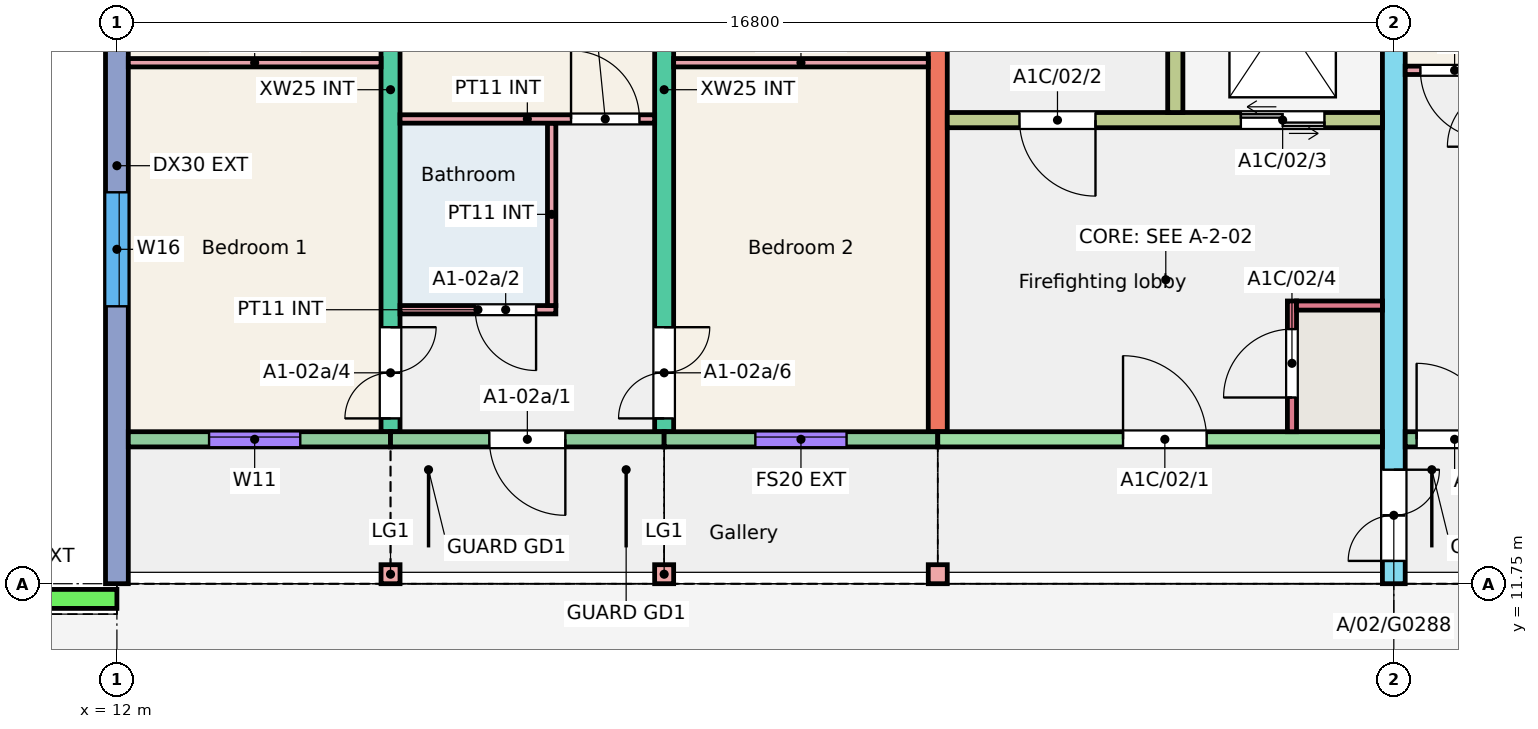
"""IFC4 building model, lengths in metres.
Left out: names, types, materials, properties, quantities, classifications, styles, units other than length and angle.
Written with IfcOpenShell. Run it as: python <this file> out.ifc"""

import sys

from ifc_helpers import new_model, si_unit, direction, frame, frame_2d, origin, origin_2d, place, context, subcontext, project, spatial, rectangle, extrude, element, fill, save


model = new_model("IFC4")
c1 = context("Model", 3, precision=1e-05, world=origin(), true_north=direction((0.0, 1.0)))
c2 = subcontext(c1, "Body", "Model", "MODEL_VIEW")
j1 = project(units=[si_unit("LENGTHUNIT", "METRE"), si_unit("PLANEANGLEUNIT", "RADIAN")], contexts=[c1])
p1 = place(None, origin())
s1 = spatial("IfcSite", under=j1, at=p1, CompositionType="ELEMENT")
p2 = place(p1, origin())
s2 = spatial("IfcBuilding", under=s1, at=p2, CompositionType="ELEMENT")
p3 = place(p2, frame((0.0, 0.0, 6.0)))
s3 = spatial("IfcBuildingStorey", under=s2, at=p3, CompositionType="ELEMENT", Elevation=6.0)
p4 = place(p3, frame((12.0, 11.75, 0.0), z_axis=(0.0, 0.0, 1.0), x_axis=(0.0, 1.0, 0.0)))
e1 = element("IfcWall", 1, at=p4, inside=s3, PredefinedType="SHEAR", context=c2, shape_type="SweptSolid", body=[
    extrude(rectangle(XDim=11.0, YDim=0.3, at=frame_2d((5.5, 0.0))), origin(), (0.0, 0.0, 1.0), 3.0),
])
p5 = place(p4, frame((3.65, 0.0, 0.9)))
e2 = element("IfcOpeningElement", 2, at=p5, cuts=e1, PredefinedType="OPENING", context=c2, shape_type="SweptSolid", body=[
    extrude(rectangle(XDim=1.5, YDim=1.5, at=frame_2d((0.75, 0.75))), frame((0.0, 0.16, 0.0), z_axis=(0.0, -1.0, 0.0), x_axis=(1.0, 0.0, 0.0)), (0.0, 0.0, 1.0), 0.32),
])
p6 = place(p4, frame((8.355, 0.0, 0.9)))
e3 = element("IfcOpeningElement", 3, at=p6, cuts=e1, PredefinedType="OPENING", context=c2, shape_type="SweptSolid", body=[
    extrude(rectangle(XDim=1.2, YDim=1.5, at=frame_2d((0.6, 0.75))), frame((0.0, 0.16, 0.0), z_axis=(0.0, -1.0, 0.0), x_axis=(1.0, 0.0, 0.0)), (0.0, 0.0, 1.0), 0.32),
])
p7 = place(p3, frame((15.6, 13.75, 0.0), z_axis=(0.0, 0.0, 1.0), x_axis=(0.0, 1.0, 0.0)))
e4 = element("IfcWall", 4, at=p7, inside=s3, PredefinedType="SHEAR", context=c2, shape_type="SweptSolid", body=[
    extrude(rectangle(XDim=9.0, YDim=0.25, at=frame_2d((4.5, 0.0))), origin(), (0.0, 0.0, 1.0), 3.0),
])
p8 = place(p7, frame((0.175, 0.0, 0.0)))
e5 = element("IfcOpeningElement", 5, at=p8, cuts=e4, PredefinedType="OPENING", context=c2, shape_type="SweptSolid", body=[
    extrude(rectangle(XDim=1.2, YDim=2.1, at=frame_2d((0.6, 1.05))), frame((0.0, 0.135, 0.0), z_axis=(0.0, -1.0, 0.0), x_axis=(1.0, 0.0, 0.0)), (0.0, 0.0, 1.0), 0.27),
])
p9 = place(p7, frame((6.4, 0.0, 0.0)))
e6 = element("IfcOpeningElement", 6, at=p9, cuts=e4, PredefinedType="OPENING", context=c2, shape_type="SweptSolid", body=[
    extrude(rectangle(XDim=1.2, YDim=2.1, at=frame_2d((0.6, 1.05))), frame((0.0, 0.135, 0.0), z_axis=(0.0, -1.0, 0.0), x_axis=(1.0, 0.0, 0.0)), (0.0, 0.0, 1.0), 0.27),
])
p10 = place(p3, frame((19.2, 13.75, 0.0), z_axis=(0.0, 0.0, 1.0), x_axis=(0.0, 1.0, 0.0)))
e7 = element("IfcWall", 7, at=p10, inside=s3, PredefinedType="SHEAR", context=c2, shape_type="SweptSolid", body=[
    extrude(rectangle(XDim=9.0, YDim=0.25, at=frame_2d((4.5, 0.0))), origin(), (0.0, 0.0, 1.0), 3.0),
])
p11 = place(p10, frame((0.175, 0.0, 0.0)))
e8 = element("IfcOpeningElement", 8, at=p11, cuts=e7, PredefinedType="OPENING", context=c2, shape_type="SweptSolid", body=[
    extrude(rectangle(XDim=1.2, YDim=2.1, at=frame_2d((0.6, 1.05))), frame((0.0, 0.135, 0.0), z_axis=(0.0, -1.0, 0.0), x_axis=(1.0, 0.0, 0.0)), (0.0, 0.0, 1.0), 0.27),
])
p12 = place(p10, frame((6.4, 0.0, 0.0)))
e9 = element("IfcOpeningElement", 9, at=p12, cuts=e7, PredefinedType="OPENING", context=c2, shape_type="SweptSolid", body=[
    extrude(rectangle(XDim=1.2, YDim=2.1, at=frame_2d((0.6, 1.05))), frame((0.0, 0.135, 0.0), z_axis=(0.0, -1.0, 0.0), x_axis=(1.0, 0.0, 0.0)), (0.0, 0.0, 1.0), 0.27),
])
p13 = place(p3, frame((22.8, 13.75, 0.0), z_axis=(0.0, 0.0, 1.0), x_axis=(0.0, 1.0, 0.0)))
e10 = element("IfcWall", 10, at=p13, inside=s3, PredefinedType="SHEAR", context=c2, shape_type="SweptSolid", body=[
    extrude(rectangle(XDim=9.0, YDim=0.25, at=frame_2d((4.5, 0.0))), origin(), (0.0, 0.0, 1.0), 3.0),
])
p14 = place(p3, frame((28.8, 11.75, 0.0), z_axis=(0.0, 0.0, 1.0), x_axis=(0.0, 1.0, 0.0)))
e11 = element("IfcWall", 11, at=p14, inside=s3, PredefinedType="SHEAR", context=c2, shape_type="SweptSolid", body=[
    extrude(rectangle(XDim=11.0, YDim=0.3, at=frame_2d((5.5, 0.0))), origin(), (0.0, 0.0, 1.0), 3.0),
])
p15 = place(p14, frame((0.3, 0.0, 0.0)))
e12 = element("IfcOpeningElement", 12, at=p15, cuts=e11, PredefinedType="OPENING", context=c2, shape_type="SweptSolid", body=[
    extrude(rectangle(XDim=1.2, YDim=2.1, at=frame_2d((0.6, 1.05))), frame((0.0, 0.16, 0.0), z_axis=(0.0, -1.0, 0.0), x_axis=(1.0, 0.0, 0.0)), (0.0, 0.0, 1.0), 0.32),
])
p16 = place(p3, frame((12.15, 13.65, 0.0), z_axis=(0.0, 0.0, 1.0), x_axis=(1.0, 0.0, 0.0)))
e13 = element("IfcWall", 13, at=p16, inside=s3, PredefinedType="SOLIDWALL", context=c2, shape_type="SweptSolid", body=[
    extrude(rectangle(XDim=3.45, YDim=0.2, at=frame_2d((1.725, 0.0))), origin(), (0.0, 0.0, 1.0), 3.0),
])
p17 = place(p16, frame((1.062, 0.0, 0.8)))
e14 = element("IfcOpeningElement", 14, at=p17, cuts=e13, PredefinedType="OPENING", context=c2, shape_type="SweptSolid", body=[
    extrude(rectangle(XDim=1.2, YDim=1.6, at=frame_2d((0.6, 0.8))), frame((0.0, 0.11, 0.0), z_axis=(0.0, -1.0, 0.0), x_axis=(1.0, 0.0, 0.0)), (0.0, 0.0, 1.0), 0.22),
])
p18 = place(p3, frame((15.6, 13.65, 0.0), z_axis=(0.0, 0.0, 1.0), x_axis=(1.0, 0.0, 0.0)))
e15 = element("IfcWall", 15, at=p18, inside=s3, PredefinedType="SOLIDWALL", context=c2, shape_type="SweptSolid", body=[
    extrude(rectangle(XDim=3.6, YDim=0.2, at=frame_2d((1.8, 0.0))), origin(), (0.0, 0.0, 1.0), 3.0),
])
p19 = place(p18, frame((1.3, 0.0, 0.0)))
e16 = element("IfcOpeningElement", 16, at=p19, cuts=e15, PredefinedType="OPENING", context=c2, shape_type="SweptSolid", body=[
    extrude(rectangle(XDim=1.0, YDim=2.1, at=frame_2d((0.5, 1.05))), frame((0.0, 0.11, 0.0), z_axis=(0.0, -1.0, 0.0), x_axis=(1.0, 0.0, 0.0)), (0.0, 0.0, 1.0), 0.22),
])
p20 = place(p3, frame((19.2, 13.65, 0.0), z_axis=(0.0, 0.0, 1.0), x_axis=(1.0, 0.0, 0.0)))
e17 = element("IfcWall", 17, at=p20, inside=s3, PredefinedType="SOLIDWALL", context=c2, shape_type="SweptSolid", body=[
    extrude(rectangle(XDim=3.6, YDim=0.2, at=frame_2d((1.8, 0.0))), origin(), (0.0, 0.0, 1.0), 3.0),
])
p21 = place(p20, frame((1.2, 0.0, 0.8)))
e18 = element("IfcOpeningElement", 18, at=p21, cuts=e17, PredefinedType="OPENING", context=c2, shape_type="SweptSolid", body=[
    extrude(rectangle(XDim=1.2, YDim=1.6, at=frame_2d((0.6, 0.8))), frame((0.0, 0.11, 0.0), z_axis=(0.0, -1.0, 0.0), x_axis=(1.0, 0.0, 0.0)), (0.0, 0.0, 1.0), 0.22),
])
p22 = place(p3, frame((22.8, 13.65, 0.0), z_axis=(0.0, 0.0, 1.0), x_axis=(1.0, 0.0, 0.0)))
e19 = element("IfcWall", 19, at=p22, inside=s3, PredefinedType="SHEAR", context=c2, shape_type="SweptSolid", body=[
    extrude(rectangle(XDim=5.85, YDim=0.2, at=frame_2d((2.925, 0.0))), origin(), (0.0, 0.0, 1.0), 3.0),
])
p23 = place(p22, frame((2.438, 0.0, 0.0)))
e20 = element("IfcOpeningElement", 20, at=p23, cuts=e19, PredefinedType="OPENING", context=c2, shape_type="SweptSolid", body=[
    extrude(rectangle(XDim=1.1, YDim=2.1, at=frame_2d((0.55, 1.05))), frame((0.0, 0.11, 0.0), z_axis=(0.0, -1.0, 0.0), x_axis=(1.0, 0.0, 0.0)), (0.0, 0.0, 1.0), 0.22),
])
p24 = place(p3, frame((22.925, 17.85, 0.0), z_axis=(0.0, 0.0, 1.0), x_axis=(1.0, 0.0, 0.0)))
e21 = element("IfcWall", 21, at=p24, inside=s3, PredefinedType="SHEAR", context=c2, shape_type="SweptSolid", body=[
    extrude(rectangle(XDim=5.725, YDim=0.2, at=frame_2d((2.862, 0.0))), origin(), (0.0, 0.0, 1.0), 3.0),
])
p25 = place(p24, frame((0.95, 0.0, 0.0)))
e22 = element("IfcOpeningElement", 22, at=p25, cuts=e21, PredefinedType="OPENING", context=c2, shape_type="SweptSolid", body=[
    extrude(rectangle(XDim=1.0, YDim=2.1, at=frame_2d((0.5, 1.05))), frame((0.0, 0.11, 0.0), z_axis=(0.0, -1.0, 0.0), x_axis=(1.0, 0.0, 0.0)), (0.0, 0.0, 1.0), 0.22),
])
p26 = place(p24, frame((3.863, 0.0, 0.0)))
e23 = element("IfcOpeningElement", 23, at=p26, cuts=e21, PredefinedType="OPENING", context=c2, shape_type="SweptSolid", body=[
    extrude(rectangle(XDim=1.1, YDim=2.1, at=frame_2d((0.55, 1.05))), frame((0.0, 0.11, 0.0), z_axis=(0.0, -1.0, 0.0), x_axis=(1.0, 0.0, 0.0)), (0.0, 0.0, 1.0), 0.22),
])
p27 = place(p3, frame((25.925, 17.95, 0.0), z_axis=(0.0, 0.0, 1.0), x_axis=(0.0, 1.0, 0.0)))
e24 = element("IfcWall", 24, at=p27, inside=s3, PredefinedType="SHEAR", context=c2, shape_type="SweptSolid", body=[
    extrude(rectangle(XDim=4.8, YDim=0.2, at=frame_2d((2.4, 0.0))), origin(), (0.0, 0.0, 1.0), 3.0),
])
p28 = place(p3, frame((27.46, 13.75, 0.0), z_axis=(0.0, 0.0, 1.0), x_axis=(0.0, 1.0, 0.0)))
e25 = element("IfcWall", 25, at=p28, inside=s3, PredefinedType="SHEAR", context=c2, shape_type="SweptSolid", body=[
    extrude(rectangle(XDim=1.72, YDim=0.12, at=frame_2d((0.86, 0.0))), origin(), (0.0, 0.0, 1.0), 3.0),
])
p29 = place(p28, frame((0.45, 0.0, 0.0)))
e26 = element("IfcOpeningElement", 26, at=p29, cuts=e25, PredefinedType="OPENING", context=c2, shape_type="SweptSolid", body=[
    extrude(rectangle(XDim=0.9, YDim=2.1, at=frame_2d((0.45, 1.05))), frame((0.0, 0.07, 0.0), z_axis=(0.0, -1.0, 0.0), x_axis=(1.0, 0.0, 0.0)), (0.0, 0.0, 1.0), 0.14),
])
p30 = place(p3, frame((27.52, 15.41, 0.0), z_axis=(0.0, 0.0, 1.0), x_axis=(1.0, 0.0, 0.0)))
e27 = element("IfcWall", 27, at=p30, inside=s3, PredefinedType="SHEAR", context=c2, shape_type="SweptSolid", body=[
    extrude(rectangle(XDim=1.13, YDim=0.12, at=frame_2d((0.565, 0.0))), origin(), (0.0, 0.0, 1.0), 3.0),
])
p31 = place(p3, frame((28.95, 13.65, 0.0), z_axis=(0.0, 0.0, 1.0), x_axis=(1.0, 0.0, 0.0)))
e28 = element("IfcWall", 28, at=p31, inside=s3, PredefinedType="SOLIDWALL", context=c2, shape_type="SweptSolid", body=[
    extrude(rectangle(XDim=3.45, YDim=0.2, at=frame_2d((1.725, 0.0))), origin(), (0.0, 0.0, 1.0), 3.0),
])
p32 = place(p31, frame((1.768, 0.0, 1.1)))
e29 = element("IfcOpeningElement", 29, at=p32, cuts=e28, PredefinedType="OPENING", context=c2, shape_type="SweptSolid", body=[
    extrude(rectangle(XDim=1.2, YDim=1.3, at=frame_2d((0.6, 0.65))), frame((0.0, 0.11, 0.0), z_axis=(0.0, -1.0, 0.0), x_axis=(1.0, 0.0, 0.0)), (0.0, 0.0, 1.0), 0.22),
])
p33 = place(p31, frame((0.15, 0.0, 0.0)))
e30 = element("IfcOpeningElement", 30, at=p33, cuts=e28, PredefinedType="OPENING", context=c2, shape_type="SweptSolid", body=[
    extrude(rectangle(XDim=1.0, YDim=2.1, at=frame_2d((0.5, 1.05))), frame((0.0, 0.11, 0.0), z_axis=(0.0, -1.0, 0.0), x_axis=(1.0, 0.0, 0.0)), (0.0, 0.0, 1.0), 0.22),
])
for number, where, z_axis, x_axis in (
    (31, (15.6, 11.875, 0.0), (0.0, 0.0, 1.0), (1.0, 0.0, 0.0)),
    (32, (19.2, 11.875, 0.0), (0.0, 0.0, 1.0), (1.0, 0.0, 0.0)),
    (33, (22.8, 11.875, 0.0), (0.0, 0.0, 1.0), (1.0, 0.0, 0.0)),
):
    element("IfcColumn", number, at=place(p3, frame(where, z_axis=z_axis, x_axis=x_axis)), inside=s3, PredefinedType="COLUMN", context=c2, shape_type="SweptSolid", body=[
        extrude(rectangle(XDim=0.25, YDim=0.25, at=origin_2d()), origin(), (0.0, 0.0, 1.0), 3.0),
    ])
p34 = place(p3, frame((9.7, 11.55, 0.0), z_axis=(0.0, 0.0, 1.0), x_axis=(1.0, 0.0, 0.0)))
e34 = element("IfcWall", 34, at=p34, inside=s3, PredefinedType="PARAPET", context=c2, shape_type="SweptSolid", body=[
    extrude(rectangle(XDim=2.3, YDim=0.25, at=frame_2d((1.15, 0.0))), origin(), (0.0, 0.0, 1.0), 1.1),
])
p35 = place(p3, frame((15.725, 15.355, 0.0), z_axis=(0.0, 0.0, 1.0), x_axis=(1.0, 0.0, 0.0)))
e35 = element("IfcWall", 35, at=p35, inside=s3, PredefinedType="PARTITIONING", context=c2, shape_type="SweptSolid", body=[
    extrude(rectangle(XDim=2.05, YDim=0.11, at=frame_2d((1.025, 0.0))), origin(), (0.0, 0.0, 1.0), 2.8),
])
p36 = place(p35, frame((0.99, 0.0, 0.0)))
e36 = element("IfcOpeningElement", 36, at=p36, cuts=e35, PredefinedType="OPENING", context=c2, shape_type="SweptSolid", body=[
    extrude(rectangle(XDim=0.8, YDim=2.1, at=frame_2d((0.4, 1.05))), frame((0.0, 0.065, 0.0), z_axis=(0.0, -1.0, 0.0), x_axis=(1.0, 0.0, 0.0)), (0.0, 0.0, 1.0), 0.13),
])
p37 = place(p3, frame((17.72, 15.41, 0.0), z_axis=(0.0, 0.0, 1.0), x_axis=(0.0, 1.0, 0.0)))
e37 = element("IfcWall", 37, at=p37, inside=s3, PredefinedType="PARTITIONING", context=c2, shape_type="SweptSolid", body=[
    extrude(rectangle(XDim=2.4, YDim=0.11, at=frame_2d((1.2, 0.0))), origin(), (0.0, 0.0, 1.0), 2.8),
])
p38 = place(p3, frame((15.725, 17.865, 0.0), z_axis=(0.0, 0.0, 1.0), x_axis=(1.0, 0.0, 0.0)))
e38 = element("IfcWall", 38, at=p38, inside=s3, PredefinedType="PARTITIONING", context=c2, shape_type="SweptSolid", body=[
    extrude(rectangle(XDim=3.35, YDim=0.11, at=frame_2d((1.675, 0.0))), origin(), (0.0, 0.0, 1.0), 2.8),
])
p39 = place(p38, frame((2.25, 0.0, 0.0)))
e39 = element("IfcOpeningElement", 39, at=p39, cuts=e38, PredefinedType="OPENING", context=c2, shape_type="SweptSolid", body=[
    extrude(rectangle(XDim=0.9, YDim=2.1, at=frame_2d((0.45, 1.05))), frame((0.0, 0.065, 0.0), z_axis=(0.0, -1.0, 0.0), x_axis=(1.0, 0.0, 0.0)), (0.0, 0.0, 1.0), 0.13),
])
p40 = place(p3, frame((12.15, 18.605, 0.0), z_axis=(0.0, 0.0, 1.0), x_axis=(1.0, 0.0, 0.0)))
e40 = element("IfcWall", 40, at=p40, inside=s3, PredefinedType="PARTITIONING", context=c2, shape_type="SweptSolid", body=[
    extrude(rectangle(XDim=3.325, YDim=0.11, at=frame_2d((1.663, 0.0))), origin(), (0.0, 0.0, 1.0), 2.8),
])
p41 = place(p3, frame((19.325, 18.605, 0.0), z_axis=(0.0, 0.0, 1.0), x_axis=(1.0, 0.0, 0.0)))
e41 = element("IfcWall", 41, at=p41, inside=s3, PredefinedType="PARTITIONING", context=c2, shape_type="SweptSolid", body=[
    extrude(rectangle(XDim=3.35, YDim=0.11, at=frame_2d((1.675, 0.0))), origin(), (0.0, 0.0, 1.0), 2.8),
])
p42 = place(p3, frame((28.95, 18.505, 0.0), z_axis=(0.0, 0.0, 1.0), x_axis=(1.0, 0.0, 0.0)))
e42 = element("IfcWall", 42, at=p42, inside=s3, PredefinedType="PARTITIONING", context=c2, shape_type="SweptSolid", body=[
    extrude(rectangle(XDim=3.325, YDim=0.11, at=frame_2d((1.663, 0.0))), origin(), (0.0, 0.0, 1.0), 2.8),
])
p43 = place(p42, frame((0.2, 0.0, 0.0)))
e43 = element("IfcOpeningElement", 43, at=p43, cuts=e42, PredefinedType="OPENING", context=c2, shape_type="SweptSolid", body=[
    extrude(rectangle(XDim=0.9, YDim=2.1, at=frame_2d((0.45, 1.05))), frame((0.0, 0.065, 0.0), z_axis=(0.0, -1.0, 0.0), x_axis=(1.0, 0.0, 0.0)), (0.0, 0.0, 1.0), 0.13),
])
p44 = place(p17, origin())
e44 = element("IfcWindow", 44, at=p44, inside=s3, PartitioningType="SINGLE_PANEL", PredefinedType="WINDOW", context=c2, shape_type="SweptSolid", body=[
    extrude(rectangle(XDim=1.2, YDim=1.6, at=frame_2d((0.6, 0.8))), frame((0.0, 0.06, 0.0), z_axis=(0.0, -1.0, 0.0), x_axis=(1.0, 0.0, 0.0)), (0.0, 0.0, 1.0), 0.06),
])
fill(e14, e44)
p45 = place(p21, origin())
e45 = element("IfcWindow", 45, at=p45, inside=s3, PartitioningType="SINGLE_PANEL", PredefinedType="WINDOW", context=c2, shape_type="SweptSolid", body=[
    extrude(rectangle(XDim=1.2, YDim=1.6, at=frame_2d((0.6, 0.8))), frame((0.0, 0.06, 0.0), z_axis=(0.0, -1.0, 0.0), x_axis=(1.0, 0.0, 0.0)), (0.0, 0.0, 1.0), 0.06),
])
fill(e18, e45)
p46 = place(p5, origin())
e46 = element("IfcWindow", 46, at=p46, inside=s3, PartitioningType="SINGLE_PANEL", PredefinedType="WINDOW", context=c2, shape_type="SweptSolid", body=[
    extrude(rectangle(XDim=1.5, YDim=1.5, at=frame_2d((0.75, 0.75))), frame((0.0, 0.0, 0.0), z_axis=(0.0, -1.0, 0.0), x_axis=(1.0, 0.0, 0.0)), (0.0, 0.0, 1.0), 0.06),
])
fill(e2, e46)
p47 = place(p19, origin())
e47 = element("IfcDoor", 47, at=p47, inside=s3, OperationType="SINGLE_SWING_RIGHT", PredefinedType="DOOR", context=c2, shape_type="SweptSolid", body=[
    extrude(rectangle(XDim=1.0, YDim=2.1, at=frame_2d((0.5, 1.05))), frame((0.0, 0.025, 0.0), z_axis=(0.0, -1.0, 0.0), x_axis=(1.0, 0.0, 0.0)), (0.0, 0.0, 1.0), 0.05),
])
fill(e16, e47)
p48 = place(p36, origin())
e48 = element("IfcDoor", 48, at=p48, inside=s3, OperationType="SINGLE_SWING_RIGHT", PredefinedType="DOOR", context=c2, shape_type="SweptSolid", body=[
    extrude(rectangle(XDim=0.8, YDim=2.1, at=frame_2d((0.4, 1.05))), frame((0.0, 0.025, 0.0), z_axis=(0.0, -1.0, 0.0), x_axis=(1.0, 0.0, 0.0)), (0.0, 0.0, 1.0), 0.05),
])
fill(e36, e48)
p49 = place(p39, origin())
e49 = element("IfcDoor", 49, at=p49, inside=s3, OperationType="SINGLE_SWING_LEFT", PredefinedType="DOOR", context=c2, shape_type="SweptSolid", body=[
    extrude(rectangle(XDim=0.9, YDim=2.1, at=frame_2d((0.45, 1.05))), frame((0.0, 0.025, 0.0), z_axis=(0.0, -1.0, 0.0), x_axis=(1.0, 0.0, 0.0)), (0.0, 0.0, 1.0), 0.05),
])
fill(e39, e49)
p50 = place(p8, origin())
e50 = element("IfcDoor", 50, at=p50, inside=s3, OperationType="DOUBLE_DOOR_SINGLE_SWING", PredefinedType="DOOR", context=c2, shape_type="SweptSolid", body=[
    extrude(rectangle(XDim=1.2, YDim=2.1, at=frame_2d((0.6, 1.05))), frame((0.0, 0.025, 0.0), z_axis=(0.0, -1.0, 0.0), x_axis=(1.0, 0.0, 0.0)), (0.0, 0.0, 1.0), 0.05),
])
fill(e5, e50)
p51 = place(p11, origin())
e51 = element("IfcDoor", 51, at=p51, inside=s3, OperationType="DOUBLE_DOOR_SINGLE_SWING", PredefinedType="DOOR", context=c2, shape_type="SweptSolid", body=[
    extrude(rectangle(XDim=1.2, YDim=2.1, at=frame_2d((0.6, 1.05))), frame((0.0, 0.025, 0.0), z_axis=(0.0, -1.0, 0.0), x_axis=(1.0, 0.0, 0.0)), (0.0, 0.0, 1.0), 0.05),
])
fill(e8, e51)
p52 = place(p33, origin())
e52 = element("IfcDoor", 52, at=p52, inside=s3, OperationType="SINGLE_SWING_LEFT", PredefinedType="DOOR", context=c2, shape_type="SweptSolid", body=[
    extrude(rectangle(XDim=1.0, YDim=2.1, at=frame_2d((0.5, 1.05))), frame((0.0, 0.025, 0.0), z_axis=(0.0, -1.0, 0.0), x_axis=(1.0, 0.0, 0.0)), (0.0, 0.0, 1.0), 0.05),
])
fill(e30, e52)
p53 = place(p43, origin())
e53 = element("IfcDoor", 53, at=p53, inside=s3, OperationType="SINGLE_SWING_RIGHT", PredefinedType="DOOR", context=c2, shape_type="SweptSolid", body=[
    extrude(rectangle(XDim=0.9, YDim=2.1, at=frame_2d((0.45, 1.05))), frame((0.0, 0.025, 0.0), z_axis=(0.0, -1.0, 0.0), x_axis=(1.0, 0.0, 0.0)), (0.0, 0.0, 1.0), 0.05),
])
fill(e43, e53)
p54 = place(p23, origin())
e54 = element("IfcDoor", 54, at=p54, inside=s3, OperationType="SINGLE_SWING_LEFT", PredefinedType="DOOR", context=c2, shape_type="SweptSolid", body=[
    extrude(rectangle(XDim=1.1, YDim=2.1, at=frame_2d((0.55, 1.05))), frame((0.0, 0.025, 0.0), z_axis=(0.0, -1.0, 0.0), x_axis=(1.0, 0.0, 0.0)), (0.0, 0.0, 1.0), 0.05),
])
fill(e20, e54)
p55 = place(p25, origin())
e55 = element("IfcDoor", 55, at=p55, inside=s3, OperationType="SINGLE_SWING_RIGHT", PredefinedType="DOOR", context=c2, shape_type="SweptSolid", body=[
    extrude(rectangle(XDim=1.0, YDim=2.1, at=frame_2d((0.5, 1.05))), frame((0.0, 0.025, 0.0), z_axis=(0.0, -1.0, 0.0), x_axis=(1.0, 0.0, 0.0)), (0.0, 0.0, 1.0), 0.05),
])
fill(e22, e55)
p56 = place(p26, origin())
e56 = element("IfcDoor", 56, at=p56, inside=s3, OperationType="DOUBLE_DOOR_SLIDING", PredefinedType="DOOR", context=c2, shape_type="SweptSolid", body=[
    extrude(rectangle(XDim=1.1, YDim=2.1, at=frame_2d((0.55, 1.05))), frame((0.0, 0.025, 0.0), z_axis=(0.0, -1.0, 0.0), x_axis=(1.0, 0.0, 0.0)), (0.0, 0.0, 1.0), 0.05),
])
fill(e23, e56)
p57 = place(p29, origin())
e57 = element("IfcDoor", 57, at=p57, inside=s3, OperationType="SINGLE_SWING_LEFT", PredefinedType="DOOR", context=c2, shape_type="SweptSolid", body=[
    extrude(rectangle(XDim=0.9, YDim=2.1, at=frame_2d((0.45, 1.05))), frame((0.0, 0.025, 0.0), z_axis=(0.0, -1.0, 0.0), x_axis=(1.0, 0.0, 0.0)), (0.0, 0.0, 1.0), 0.05),
])
fill(e26, e57)
p58 = place(p15, origin())
e58 = element("IfcDoor", 58, at=p58, inside=s3, OperationType="DOUBLE_DOOR_SINGLE_SWING", PredefinedType="DOOR", context=c2, shape_type="SweptSolid", body=[
    extrude(rectangle(XDim=1.2, YDim=2.1, at=frame_2d((0.6, 1.05))), frame((0.0, 0.025, 0.0), z_axis=(0.0, -1.0, 0.0), x_axis=(1.0, 0.0, 0.0)), (0.0, 0.0, 1.0), 0.05),
])
fill(e12, e58)
save(model, sys.argv[1])
